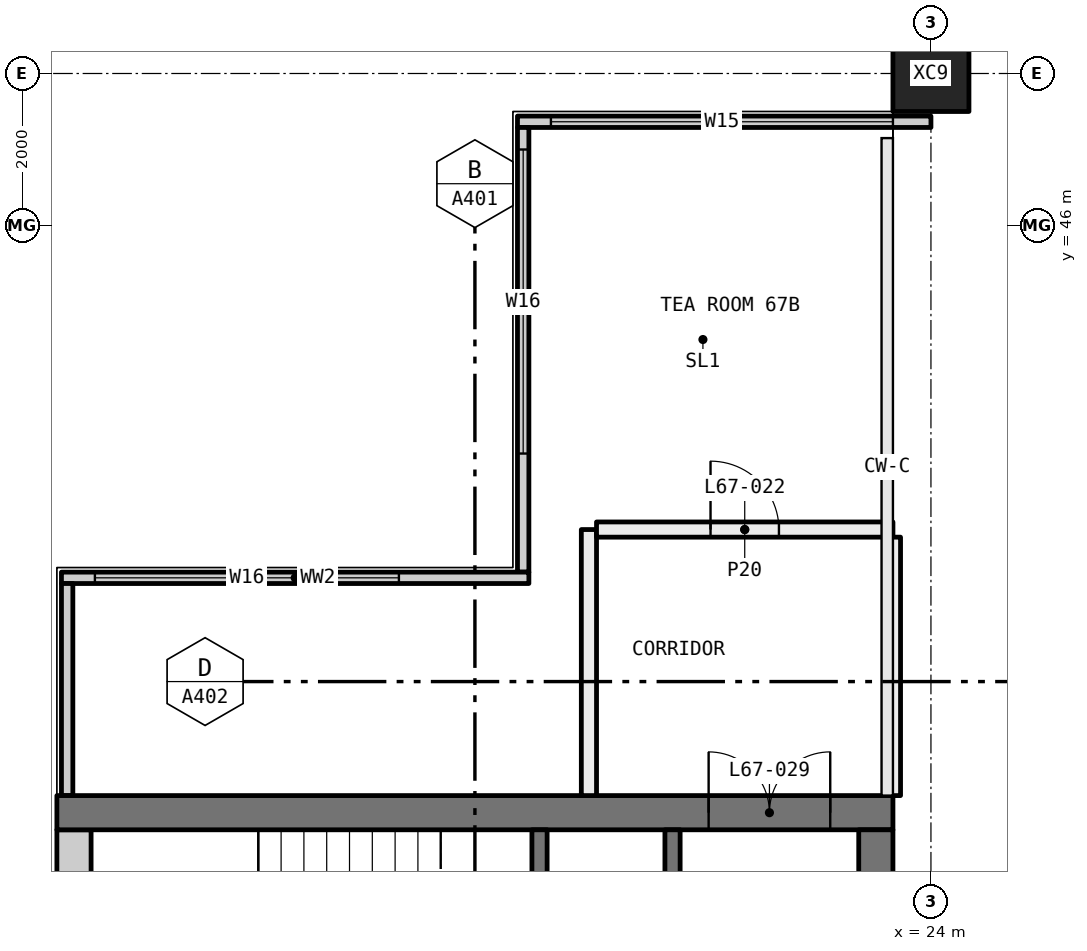
"""IFC4 building model, lengths in metres.
Left out: names, types, materials, properties, quantities, classifications, styles, units other than length and angle.
Written with IfcOpenShell. Run it as: python <this file> out.ifc"""

import sys

from ifc_helpers import new_model, si_unit, direction, frame, frame_2d, origin, origin_2d, place, context, subcontext, project, spatial, rectangle, hollow_rectangle, extrude, element, fill, save


model = new_model("IFC4")
c1 = context("Model", 3, precision=1e-05, world=origin(), true_north=direction((0.0, 1.0)))
c2 = subcontext(c1, "Body", "Model", "MODEL_VIEW")
j1 = project(units=[si_unit("LENGTHUNIT", "METRE"), si_unit("PLANEANGLEUNIT", "RADIAN")], contexts=[c1])
p1 = place(None, origin())
s1 = spatial("IfcSite", under=j1, at=p1, CompositionType="ELEMENT")
p2 = place(p1, origin())
s2 = spatial("IfcBuilding", under=s1, at=p2, CompositionType="ELEMENT")
p3 = place(p2, frame((0.0, 0.0, 249.0)))
s3 = spatial("IfcBuildingStorey", under=s2, at=p3, CompositionType="ELEMENT", Elevation=249.0)
p4 = place(p3, frame((24.0, 48.0, -0.4), z_axis=(0.0, 0.0, 1.0), x_axis=(1.0, 0.0, 0.0)))
e1 = element("IfcColumn", 1, at=p4, inside=s3, PredefinedType="COLUMN", context=c2, shape_type="SweptSolid", body=[
    extrude(hollow_rectangle(XDim=1.0, YDim=1.0, WallThickness=0.036, at=origin_2d()), origin(), (0.0, 0.0, 1.0), 3.45),
])
p5 = place(p3, frame((18.56, 47.365, 0.0), z_axis=(0.0, 0.0, 1.0), x_axis=(1.0, 0.0, 0.0)))
e2 = element("IfcWall", 2, at=p5, inside=s3, PredefinedType="ELEMENTEDWALL", context=c2, shape_type="SweptSolid", body=[
    extrude(rectangle(XDim=5.44, YDim=0.15, at=frame_2d((2.72, 0.0))), origin(), (0.0, 0.0, 1.0), 3.05),
])
p6 = place(p5, frame((0.44, 0.0, 0.45)))
e3 = element("IfcOpeningElement", 3, at=p6, cuts=e2, PredefinedType="OPENING", context=c2, shape_type="SweptSolid", body=[
    extrude(rectangle(XDim=4.5, YDim=2.55, at=frame_2d((2.25, 1.275))), frame((0.0, 0.085, 0.0), z_axis=(0.0, -1.0, 0.0), x_axis=(1.0, 0.0, 0.0)), (0.0, 0.0, 1.0), 0.17),
])
p7 = place(p3, frame((18.635, 41.44, 0.0), z_axis=(0.0, 0.0, 1.0), x_axis=(0.0, 1.0, 0.0)))
e4 = element("IfcWall", 4, at=p7, inside=s3, PredefinedType="ELEMENTEDWALL", context=c2, shape_type="SweptSolid", body=[
    extrude(rectangle(XDim=5.85, YDim=0.15, at=frame_2d((2.925, 0.0))), origin(), (0.0, 0.0, 1.0), 3.05),
])
p8 = place(p7, frame((1.56, 0.0, 0.45)))
e5 = element("IfcOpeningElement", 5, at=p8, cuts=e4, PredefinedType="OPENING", context=c2, shape_type="SweptSolid", body=[
    extrude(rectangle(XDim=4.0, YDim=2.55, at=frame_2d((2.0, 1.275))), frame((0.0, 0.085, 0.0), z_axis=(0.0, -1.0, 0.0), x_axis=(1.0, 0.0, 0.0)), (0.0, 0.0, 1.0), 0.17),
])
p9 = place(p3, frame((12.56, 41.365, 0.0), z_axis=(0.0, 0.0, 1.0), x_axis=(1.0, 0.0, 0.0)))
e6 = element("IfcWall", 6, at=p9, inside=s3, PredefinedType="ELEMENTEDWALL", context=c2, shape_type="SweptSolid", body=[
    extrude(rectangle(XDim=6.15, YDim=0.15, at=frame_2d((3.075, 0.0))), origin(), (0.0, 0.0, 1.0), 3.05),
])
p10 = place(p9, frame((0.44, 0.0, 0.45)))
e7 = element("IfcOpeningElement", 7, at=p10, cuts=e6, PredefinedType="OPENING", context=c2, shape_type="SweptSolid", body=[
    extrude(rectangle(XDim=4.0, YDim=2.55, at=frame_2d((2.0, 1.275))), frame((0.0, 0.085, 0.0), z_axis=(0.0, -1.0, 0.0), x_axis=(1.0, 0.0, 0.0)), (0.0, 0.0, 1.0), 0.17),
])
p11 = place(p3, frame((12.635, 38.5, 0.0), z_axis=(0.0, 0.0, 1.0), x_axis=(0.0, 1.0, 0.0)))
e8 = element("IfcWall", 8, at=p11, inside=s3, PredefinedType="ELEMENTEDWALL", context=c2, shape_type="SweptSolid", body=[
    extrude(rectangle(XDim=2.79, YDim=0.15, at=frame_2d((1.395, 0.0))), origin(), (0.0, 0.0, 1.0), 3.05),
])
p12 = place(p3, frame((19.5, 38.5, 0.0), z_axis=(0.0, 0.0, 1.0), x_axis=(0.0, 1.0, 0.0)))
e9 = element("IfcWall", 9, at=p12, inside=s3, PredefinedType="PARTITIONING", context=c2, shape_type="SweptSolid", body=[
    extrude(rectangle(XDim=3.5, YDim=0.2, at=frame_2d((1.75, 0.0))), origin(), (0.0, 0.0, 1.0), 3.05),
])
p13 = place(p3, frame((19.6, 42.0, 0.0), z_axis=(0.0, 0.0, 1.0), x_axis=(1.0, 0.0, 0.0)))
e10 = element("IfcWall", 10, at=p13, inside=s3, PredefinedType="PARTITIONING", context=c2, shape_type="SweptSolid", body=[
    extrude(rectangle(XDim=3.9, YDim=0.2, at=frame_2d((1.95, 0.0))), origin(), (0.0, 0.0, 1.0), 3.05),
])
p14 = place(p13, frame((1.5, 0.0, 0.0)))
e11 = element("IfcOpeningElement", 11, at=p14, cuts=e10, PredefinedType="OPENING", context=c2, shape_type="SweptSolid", body=[
    extrude(rectangle(XDim=0.9, YDim=2.1, at=frame_2d((0.45, 1.05))), frame((0.0, 0.11, 0.0), z_axis=(0.0, -1.0, 0.0), x_axis=(1.0, 0.0, 0.0)), (0.0, 0.0, 1.0), 0.22),
])
p15 = place(p3, frame((23.5, 41.9, 0.0), z_axis=(0.0, 0.0, 1.0), x_axis=(0.0, -1.0, 0.0)))
e12 = element("IfcWall", 12, at=p15, inside=s3, PredefinedType="PARTITIONING", context=c2, shape_type="SweptSolid", body=[
    extrude(rectangle(XDim=3.4, YDim=0.2, at=frame_2d((1.7, 0.0))), origin(), (0.0, 0.0, 1.0), 3.05),
])
p16 = place(p3, frame((12.5, 38.275, 0.0), z_axis=(0.0, 0.0, 1.0), x_axis=(1.0, 0.0, 0.0)))
e13 = element("IfcWall", 13, at=p16, inside=s3, PredefinedType="SHEAR", context=c2, shape_type="SweptSolid", body=[
    extrude(rectangle(XDim=11.0, YDim=0.45, at=frame_2d((5.5, 0.0))), origin(), (0.0, 0.0, 1.0), 3.05),
])
p17 = place(p16, frame((8.575, 0.0, 0.0)))
e14 = element("IfcOpeningElement", 14, at=p17, cuts=e13, PredefinedType="OPENING", context=c2, shape_type="SweptSolid", body=[
    extrude(rectangle(XDim=1.6, YDim=2.1, at=frame_2d((0.8, 1.05))), frame((0.0, 0.235, 0.0), z_axis=(0.0, -1.0, 0.0), x_axis=(1.0, 0.0, 0.0)), (0.0, 0.0, 1.0), 0.47),
])
p18 = place(p3, frame((12.725, 21.95, 0.0), z_axis=(0.0, 0.0, 1.0), x_axis=(0.0, 1.0, 0.0)))
e15 = element("IfcWall", 15, at=p18, inside=s3, PredefinedType="SHEAR", context=c2, shape_type="SweptSolid", body=[
    extrude(rectangle(XDim=16.1, YDim=0.45, at=frame_2d((8.05, 0.0))), origin(), (0.0, 0.0, 1.0), 3.05),
])
p19 = place(p3, frame((23.275, 21.95, 0.0), z_axis=(0.0, 0.0, 1.0), x_axis=(0.0, 1.0, 0.0)))
e16 = element("IfcWall", 16, at=p19, inside=s3, PredefinedType="SHEAR", context=c2, shape_type="SweptSolid", body=[
    extrude(rectangle(XDim=16.1, YDim=0.45, at=frame_2d((8.05, 0.0))), origin(), (0.0, 0.0, 1.0), 3.05),
])
p20 = place(p19, frame((7.25, 0.0, 0.0)))
e17 = element("IfcOpeningElement", 17, at=p20, cuts=e16, PredefinedType="OPENING", context=c2, shape_type="SweptSolid", body=[
    extrude(rectangle(XDim=1.6, YDim=2.1, at=frame_2d((0.8, 1.05))), frame((0.0, 0.235, 0.0), z_axis=(0.0, -1.0, 0.0), x_axis=(1.0, 0.0, 0.0)), (0.0, 0.0, 1.0), 0.47),
])
p21 = place(p3, frame((20.6, 25.1, 0.0), z_axis=(0.0, 0.0, 1.0), x_axis=(0.0, 1.0, 0.0)))
e18 = element("IfcWall", 18, at=p21, inside=s3, PredefinedType="SOLIDWALL", context=c2, shape_type="SweptSolid", body=[
    extrude(rectangle(XDim=12.95, YDim=0.2, at=frame_2d((6.475, 0.0))), origin(), (0.0, 0.0, 1.0), 3.05),
])
p22 = place(p21, frame((0.6, 0.0, 0.0)))
e19 = element("IfcOpeningElement", 19, at=p22, cuts=e18, PredefinedType="OPENING", context=c2, shape_type="SweptSolid", body=[
    extrude(rectangle(XDim=1.1, YDim=2.1, at=frame_2d((0.55, 1.05))), frame((0.0, 0.11, 0.0), z_axis=(0.0, -1.0, 0.0), x_axis=(1.0, 0.0, 0.0)), (0.0, 0.0, 1.0), 0.22),
])
p23 = place(p21, frame((3.1, 0.0, 0.0)))
e20 = element("IfcOpeningElement", 20, at=p23, cuts=e18, PredefinedType="OPENING", context=c2, shape_type="SweptSolid", body=[
    extrude(rectangle(XDim=1.1, YDim=2.1, at=frame_2d((0.55, 1.05))), frame((0.0, 0.11, 0.0), z_axis=(0.0, -1.0, 0.0), x_axis=(1.0, 0.0, 0.0)), (0.0, 0.0, 1.0), 0.22),
])
p24 = place(p21, frame((5.6, 0.0, 0.0)))
e21 = element("IfcOpeningElement", 21, at=p24, cuts=e18, PredefinedType="OPENING", context=c2, shape_type="SweptSolid", body=[
    extrude(rectangle(XDim=1.1, YDim=2.1, at=frame_2d((0.55, 1.05))), frame((0.0, 0.11, 0.0), z_axis=(0.0, -1.0, 0.0), x_axis=(1.0, 0.0, 0.0)), (0.0, 0.0, 1.0), 0.22),
])
p25 = place(p21, frame((8.1, 0.0, 0.0)))
e22 = element("IfcOpeningElement", 22, at=p25, cuts=e18, PredefinedType="OPENING", context=c2, shape_type="SweptSolid", body=[
    extrude(rectangle(XDim=1.1, YDim=2.1, at=frame_2d((0.55, 1.05))), frame((0.0, 0.11, 0.0), z_axis=(0.0, -1.0, 0.0), x_axis=(1.0, 0.0, 0.0)), (0.0, 0.0, 1.0), 0.22),
])
p26 = place(p21, frame((10.975, 0.0, 0.0)))
e23 = element("IfcOpeningElement", 23, at=p26, cuts=e18, PredefinedType="OPENING", context=c2, shape_type="SweptSolid", body=[
    extrude(rectangle(XDim=1.0, YDim=2.1, at=frame_2d((0.5, 1.05))), frame((0.0, 0.11, 0.0), z_axis=(0.0, -1.0, 0.0), x_axis=(1.0, 0.0, 0.0)), (0.0, 0.0, 1.0), 0.22),
])
p27 = place(p3, frame((18.85, 35.1, 0.0), z_axis=(0.0, 0.0, 1.0), x_axis=(0.0, 1.0, 0.0)))
e24 = element("IfcWall", 24, at=p27, inside=s3, PredefinedType="SOLIDWALL", context=c2, shape_type="SweptSolid", body=[
    extrude(rectangle(XDim=2.95, YDim=0.2, at=frame_2d((1.475, 0.0))), origin(), (0.0, 0.0, 1.0), 3.05),
])
p28 = place(p27, frame((0.975, 0.0, 0.0)))
e25 = element("IfcOpeningElement", 25, at=p28, cuts=e24, PredefinedType="OPENING", context=c2, shape_type="SweptSolid", body=[
    extrude(rectangle(XDim=1.0, YDim=2.1, at=frame_2d((0.5, 1.05))), frame((0.0, 0.11, 0.0), z_axis=(0.0, -1.0, 0.0), x_axis=(1.0, 0.0, 0.0)), (0.0, 0.0, 1.0), 0.22),
])
p29 = place(p6, origin())
e26 = element("IfcWindow", 26, at=p29, inside=s3, PartitioningType="SINGLE_PANEL", PredefinedType="WINDOW", context=c2, shape_type="SweptSolid", body=[
    extrude(rectangle(XDim=4.5, YDim=2.55, at=frame_2d((2.25, 1.275))), frame((0.0, 0.03, 0.0), z_axis=(0.0, -1.0, 0.0), x_axis=(1.0, 0.0, 0.0)), (0.0, 0.0, 1.0), 0.06),
])
fill(e3, e26)
p30 = place(p8, origin())
e27 = element("IfcWindow", 27, at=p30, inside=s3, PartitioningType="SINGLE_PANEL", PredefinedType="WINDOW", context=c2, shape_type="SweptSolid", body=[
    extrude(rectangle(XDim=4.0, YDim=2.55, at=frame_2d((2.0, 1.275))), frame((0.0, 0.03, 0.0), z_axis=(0.0, -1.0, 0.0), x_axis=(1.0, 0.0, 0.0)), (0.0, 0.0, 1.0), 0.06),
])
fill(e5, e27)
p31 = place(p10, origin())
e28 = element("IfcWindow", 28, at=p31, inside=s3, PartitioningType="SINGLE_PANEL", PredefinedType="WINDOW", context=c2, shape_type="SweptSolid", body=[
    extrude(rectangle(XDim=4.0, YDim=2.55, at=frame_2d((2.0, 1.275))), frame((0.0, 0.03, 0.0), z_axis=(0.0, -1.0, 0.0), x_axis=(1.0, 0.0, 0.0)), (0.0, 0.0, 1.0), 0.06),
])
fill(e7, e28)
p32 = place(p14, origin())
e29 = element("IfcDoor", 29, at=p32, inside=s3, OperationType="SINGLE_SWING_RIGHT", PredefinedType="DOOR", context=c2, shape_type="SweptSolid", body=[
    extrude(rectangle(XDim=0.9, YDim=2.1, at=frame_2d((0.45, 1.05))), frame((0.0, 0.025, 0.0), z_axis=(0.0, -1.0, 0.0), x_axis=(1.0, 0.0, 0.0)), (0.0, 0.0, 1.0), 0.05),
])
fill(e11, e29)
p33 = place(p17, origin())
e30 = element("IfcDoor", 30, at=p33, inside=s3, OperationType="DOUBLE_DOOR_SINGLE_SWING", PredefinedType="DOOR", context=c2, shape_type="SweptSolid", body=[
    extrude(rectangle(XDim=1.6, YDim=2.1, at=frame_2d((0.8, 1.05))), frame((0.0, 0.025, 0.0), z_axis=(0.0, -1.0, 0.0), x_axis=(1.0, 0.0, 0.0)), (0.0, 0.0, 1.0), 0.05),
])
fill(e14, e30)
save(model, sys.argv[1])
